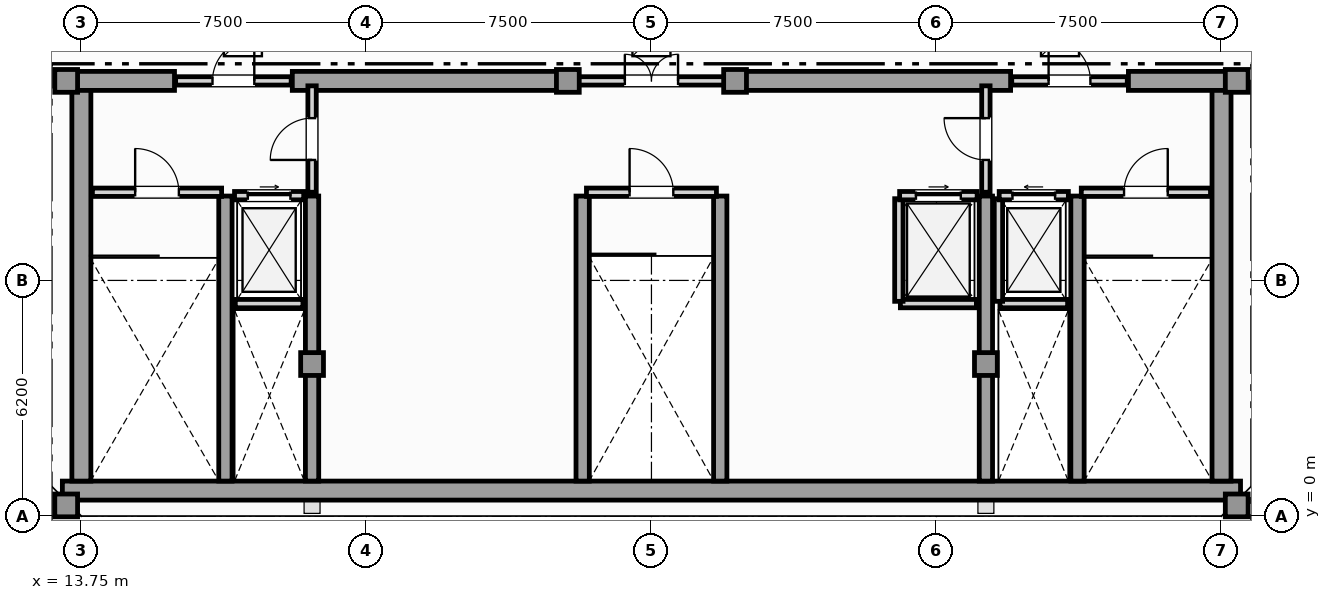
"""IFC4 building model, lengths in metres.
Left out: names, types, materials, properties, quantities, classifications, styles, units other than length and angle.
Written with IfcOpenShell. Run it as: python <this file> out.ifc"""

import sys

from ifc_helpers import new_model, si_unit, direction, frame, frame_2d, origin, origin_2d, place, context, subcontext, project, spatial, rectangle, hollow_rectangle, extrude, element, fill, save


model = new_model("IFC4")
c1 = context("Model", 3, precision=1e-05, world=origin(), true_north=direction((0.0, 1.0)))
c2 = subcontext(c1, "Body", "Model", "MODEL_VIEW")
j1 = project(units=[si_unit("LENGTHUNIT", "METRE"), si_unit("PLANEANGLEUNIT", "RADIAN")], contexts=[c1])
p1 = place(None, origin())
s1 = spatial("IfcSite", under=j1, at=p1, CompositionType="ELEMENT")
p2 = place(p1, origin())
s2 = spatial("IfcBuilding", under=s1, at=p2, CompositionType="ELEMENT")
p3 = place(p2, frame((0.0, 0.0, 388.25)))
s3 = spatial("IfcBuildingStorey", under=s2, at=p3, CompositionType="ELEMENT", Elevation=388.25)
p4 = place(p3, frame((13.25, 0.67, 0.0), z_axis=(0.0, 0.0, 1.0), x_axis=(1.0, 0.0, 0.0)))
e1 = element("IfcWall", 1, at=p4, inside=s3, PredefinedType="SHEAR", context=c2, shape_type="SweptSolid", body=[
    extrude(rectangle(XDim=31.0, YDim=0.5, at=frame_2d((15.5, 0.0))), origin(), (0.0, 0.0, 1.0), 5.0),
])
for number, where, z_axis, x_axis in (
    (2, (13.75, 0.92, 0.0), (0.0, 0.0, 1.0), (0.0, 1.0, 0.0)),
    (3, (43.75, 0.92, 0.0), (0.0, 0.0, 1.0), (0.0, 1.0, 0.0)),
):
    element("IfcWall", number, at=place(p3, frame(where, z_axis=z_axis, x_axis=x_axis)), inside=s3, PredefinedType="SHEAR", context=c2, shape_type="SweptSolid", body=[
        extrude(rectangle(XDim=10.53, YDim=0.5, at=frame_2d((5.265, 0.0))), origin(), (0.0, 0.0, 1.0), 5.0),
    ])
p5 = place(p3, frame((13.25, 11.45, 0.0), z_axis=(0.0, 0.0, 1.0), x_axis=(1.0, 0.0, 0.0)))
e4 = element("IfcWall", 4, at=p5, inside=s3, PredefinedType="SHEAR", context=c2, shape_type="SweptSolid", body=[
    extrude(rectangle(XDim=2.95, YDim=0.5, at=frame_2d((1.475, 0.0))), origin(), (0.0, 0.0, 1.0), 5.0),
])
for number, where, z_axis, x_axis in (
    (5, (19.3, 11.45, 0.0), (0.0, 0.0, 1.0), (1.0, 0.0, 0.0)),
    (6, (30.9, 11.45, 0.0), (0.0, 0.0, 1.0), (1.0, 0.0, 0.0)),
):
    element("IfcWall", number, at=place(p3, frame(where, z_axis=z_axis, x_axis=x_axis)), inside=s3, PredefinedType="SHEAR", context=c2, shape_type="SweptSolid", body=[
        extrude(rectangle(XDim=7.3, YDim=0.5, at=frame_2d((3.65, 0.0))), origin(), (0.0, 0.0, 1.0), 5.0),
    ])
p6 = place(p3, frame((41.3, 11.45, 0.0), z_axis=(0.0, 0.0, 1.0), x_axis=(1.0, 0.0, 0.0)))
e7 = element("IfcWall", 7, at=p6, inside=s3, PredefinedType="SHEAR", context=c2, shape_type="SweptSolid", body=[
    extrude(rectangle(XDim=2.95, YDim=0.5, at=frame_2d((1.475, 0.0))), origin(), (0.0, 0.0, 1.0), 5.0),
])
for number, where, z_axis, x_axis in (
    (8, (17.54, 0.92, 0.0), (0.0, 0.0, 1.0), (0.0, 1.0, 0.0)),
    (9, (19.82, 0.92, 0.0), (0.0, 0.0, 1.0), (0.0, 1.0, 0.0)),
    (10, (26.94, 0.92, 0.0), (0.0, 0.0, 1.0), (0.0, 1.0, 0.0)),
    (11, (30.56, 0.92, 0.0), (0.0, 0.0, 1.0), (0.0, 1.0, 0.0)),
    (12, (37.55, 0.92, 0.0), (0.0, 0.0, 1.0), (0.0, 1.0, 0.0)),
    (13, (39.96, 0.92, 0.0), (0.0, 0.0, 1.0), (0.0, 1.0, 0.0)),
):
    element("IfcWall", number, at=place(p3, frame(where, z_axis=z_axis, x_axis=x_axis)), inside=s3, PredefinedType="SHEAR", context=c2, shape_type="SweptSolid", body=[
        extrude(rectangle(XDim=7.5, YDim=0.35, at=frame_2d((3.75, 0.0))), origin(), (0.0, 0.0, 1.0), 5.0),
    ])
for number, where, z_axis, x_axis in (
    (14, (13.35, 0.28, 0.0), (0.0, 0.0, 1.0), (1.0, 0.0, 0.0)),
    (15, (44.15, 0.28, 0.0), (0.0, 0.0, 1.0), (1.0, 0.0, 0.0)),
    (16, (13.35, 11.45, 0.0), (0.0, 0.0, 1.0), (1.0, 0.0, 0.0)),
    (17, (44.15, 11.45, 0.0), (0.0, 0.0, 1.0), (1.0, 0.0, 0.0)),
    (18, (19.82, 4.0, 0.0), (0.0, 0.0, 1.0), (1.0, 0.0, 0.0)),
    (19, (37.55, 4.0, 0.0), (0.0, 0.0, 1.0), (1.0, 0.0, 0.0)),
    (20, (26.55, 11.45, 0.0), (0.0, 0.0, 1.0), (1.0, 0.0, 0.0)),
    (21, (30.95, 11.45, 0.0), (0.0, 0.0, 1.0), (1.0, 0.0, 0.0)),
):
    element("IfcColumn", number, at=place(p3, frame(where, z_axis=z_axis, x_axis=x_axis)), inside=s3, PredefinedType="USERDEFINED", context=c2, shape_type="SweptSolid", body=[
        extrude(hollow_rectangle(XDim=0.6, YDim=0.6, WallThickness=0.04, at=origin_2d()), origin(), (0.0, 0.0, 1.0), 5.35),
    ])
p7 = place(p3, frame((17.8, 5.59, 0.0), z_axis=(0.0, 0.0, 1.0), x_axis=(1.0, 0.0, 0.0)))
e22 = element("IfcWall", 22, at=p7, inside=s3, PredefinedType="SOLIDWALL", context=c2, shape_type="SweptSolid", body=[
    extrude(rectangle(XDim=1.78, YDim=0.22, at=frame_2d((0.89, 0.0))), origin(), (0.0, 0.0, 1.0), 5.0),
])
p8 = place(p3, frame((17.78, 8.43, 0.0), z_axis=(0.0, 0.0, 1.0), x_axis=(1.0, 0.0, 0.0)))
e23 = element("IfcWall", 23, at=p8, inside=s3, PredefinedType="SOLIDWALL", context=c2, shape_type="SweptSolid", body=[
    extrude(rectangle(XDim=1.82, YDim=0.22, at=frame_2d((0.91, 0.0))), origin(), (0.0, 0.0, 1.0), 5.0),
])
p9 = place(p8, frame((0.35, 0.0, 0.0)))
e24 = element("IfcOpeningElement", 24, at=p9, cuts=e23, PredefinedType="OPENING", context=c2, shape_type="SweptSolid", body=[
    extrude(rectangle(XDim=1.12, YDim=2.25, at=frame_2d((0.56, 1.125))), frame((0.0, 0.12, 0.0), z_axis=(0.0, -1.0, 0.0), x_axis=(1.0, 0.0, 0.0)), (0.0, 0.0, 1.0), 0.24),
])
p10 = place(p3, frame((37.92, 5.59, 0.0), z_axis=(0.0, 0.0, 1.0), x_axis=(1.0, 0.0, 0.0)))
e25 = element("IfcWall", 25, at=p10, inside=s3, PredefinedType="SOLIDWALL", context=c2, shape_type="SweptSolid", body=[
    extrude(rectangle(XDim=1.78, YDim=0.22, at=frame_2d((0.89, 0.0))), origin(), (0.0, 0.0, 1.0), 5.0),
])
p11 = place(p3, frame((37.88, 5.65, 0.0), z_axis=(0.0, 0.0, 1.0), x_axis=(0.0, 1.0, 0.0)))
e26 = element("IfcWall", 26, at=p11, inside=s3, PredefinedType="SOLIDWALL", context=c2, shape_type="SweptSolid", body=[
    extrude(rectangle(XDim=2.7, YDim=0.22, at=frame_2d((1.35, 0.0))), origin(), (0.0, 0.0, 1.0), 5.0),
])
p12 = place(p3, frame((37.9, 8.43, 0.0), z_axis=(0.0, 0.0, 1.0), x_axis=(1.0, 0.0, 0.0)))
e27 = element("IfcWall", 27, at=p12, inside=s3, PredefinedType="SOLIDWALL", context=c2, shape_type="SweptSolid", body=[
    extrude(rectangle(XDim=1.82, YDim=0.22, at=frame_2d((0.91, 0.0))), origin(), (0.0, 0.0, 1.0), 5.0),
])
p13 = place(p12, frame((0.35, 0.0, 0.0)))
e28 = element("IfcOpeningElement", 28, at=p13, cuts=e27, PredefinedType="OPENING", context=c2, shape_type="SweptSolid", body=[
    extrude(rectangle(XDim=1.12, YDim=2.25, at=frame_2d((0.56, 1.125))), frame((0.0, 0.12, 0.0), z_axis=(0.0, -1.0, 0.0), x_axis=(1.0, 0.0, 0.0)), (0.0, 0.0, 1.0), 0.24),
])
p14 = place(p3, frame((35.3, 5.59, 0.0), z_axis=(0.0, 0.0, 1.0), x_axis=(1.0, 0.0, 0.0)))
e29 = element("IfcWall", 29, at=p14, inside=s3, PredefinedType="SOLIDWALL", context=c2, shape_type="SweptSolid", body=[
    extrude(rectangle(XDim=2.0, YDim=0.22, at=frame_2d((1.0, 0.0))), origin(), (0.0, 0.0, 1.0), 5.0),
])
p15 = place(p3, frame((35.26, 5.65, 0.0), z_axis=(0.0, 0.0, 1.0), x_axis=(0.0, 1.0, 0.0)))
e30 = element("IfcWall", 30, at=p15, inside=s3, PredefinedType="SOLIDWALL", context=c2, shape_type="SweptSolid", body=[
    extrude(rectangle(XDim=2.7, YDim=0.22, at=frame_2d((1.35, 0.0))), origin(), (0.0, 0.0, 1.0), 5.0),
])
p16 = place(p3, frame((35.28, 8.43, 0.0), z_axis=(0.0, 0.0, 1.0), x_axis=(1.0, 0.0, 0.0)))
e31 = element("IfcWall", 31, at=p16, inside=s3, PredefinedType="SOLIDWALL", context=c2, shape_type="SweptSolid", body=[
    extrude(rectangle(XDim=2.04, YDim=0.22, at=frame_2d((1.02, 0.0))), origin(), (0.0, 0.0, 1.0), 5.0),
])
p17 = place(p16, frame((0.43, 0.0, 0.0)))
e32 = element("IfcOpeningElement", 32, at=p17, cuts=e31, PredefinedType="OPENING", context=c2, shape_type="SweptSolid", body=[
    extrude(rectangle(XDim=1.18, YDim=2.2, at=frame_2d((0.59, 1.1))), frame((0.0, 0.12, 0.0), z_axis=(0.0, -1.0, 0.0), x_axis=(1.0, 0.0, 0.0)), (0.0, 0.0, 1.0), 0.24),
])
p18 = place(p3, frame((14.04, 8.52, 0.0), z_axis=(0.0, 0.0, 1.0), x_axis=(1.0, 0.0, 0.0)))
e33 = element("IfcWall", 33, at=p18, inside=s3, PredefinedType="SOLIDWALL", context=c2, shape_type="SweptSolid", body=[
    extrude(rectangle(XDim=3.4, YDim=0.22, at=frame_2d((1.7, 0.0))), origin(), (0.0, 0.0, 1.0), 5.0),
])
p19 = place(p18, frame((1.125, 0.0, 0.0)))
e34 = element("IfcOpeningElement", 34, at=p19, cuts=e33, PredefinedType="OPENING", context=c2, shape_type="SweptSolid", body=[
    extrude(rectangle(XDim=1.15, YDim=2.2, at=frame_2d((0.575, 1.1))), frame((0.0, 0.12, 0.0), z_axis=(0.0, -1.0, 0.0), x_axis=(1.0, 0.0, 0.0)), (0.0, 0.0, 1.0), 0.24),
])
p20 = place(p3, frame((40.06, 8.52, 0.0), z_axis=(0.0, 0.0, 1.0), x_axis=(1.0, 0.0, 0.0)))
e35 = element("IfcWall", 35, at=p20, inside=s3, PredefinedType="SOLIDWALL", context=c2, shape_type="SweptSolid", body=[
    extrude(rectangle(XDim=3.4, YDim=0.22, at=frame_2d((1.7, 0.0))), origin(), (0.0, 0.0, 1.0), 5.0),
])
p21 = place(p20, frame((1.125, 0.0, 0.0)))
e36 = element("IfcOpeningElement", 36, at=p21, cuts=e35, PredefinedType="OPENING", context=c2, shape_type="SweptSolid", body=[
    extrude(rectangle(XDim=1.15, YDim=2.2, at=frame_2d((0.575, 1.1))), frame((0.0, 0.12, 0.0), z_axis=(0.0, -1.0, 0.0), x_axis=(1.0, 0.0, 0.0)), (0.0, 0.0, 1.0), 0.24),
])
p22 = place(p3, frame((27.04, 8.52, 0.0), z_axis=(0.0, 0.0, 1.0), x_axis=(1.0, 0.0, 0.0)))
e37 = element("IfcWall", 37, at=p22, inside=s3, PredefinedType="SOLIDWALL", context=c2, shape_type="SweptSolid", body=[
    extrude(rectangle(XDim=3.42, YDim=0.22, at=frame_2d((1.71, 0.0))), origin(), (0.0, 0.0, 1.0), 5.0),
])
p23 = place(p22, frame((1.135, 0.0, 0.0)))
e38 = element("IfcOpeningElement", 38, at=p23, cuts=e37, PredefinedType="OPENING", context=c2, shape_type="SweptSolid", body=[
    extrude(rectangle(XDim=1.15, YDim=2.2, at=frame_2d((0.575, 1.1))), frame((0.0, 0.12, 0.0), z_axis=(0.0, -1.0, 0.0), x_axis=(1.0, 0.0, 0.0)), (0.0, 0.0, 1.0), 0.24),
])
p24 = place(p3, frame((19.82, 8.52, 0.0), z_axis=(0.0, 0.0, 1.0), x_axis=(0.0, 1.0, 0.0)))
e39 = element("IfcWall", 39, at=p24, inside=s3, PredefinedType="SOLIDWALL", context=c2, shape_type="SweptSolid", body=[
    extrude(rectangle(XDim=2.8, YDim=0.22, at=frame_2d((1.4, 0.0))), origin(), (0.0, 0.0, 1.0), 4.456),
])
p25 = place(p24, frame((0.85, 0.0, 0.0)))
e40 = element("IfcOpeningElement", 40, at=p25, cuts=e39, PredefinedType="OPENING", context=c2, shape_type="SweptSolid", body=[
    extrude(rectangle(XDim=1.1, YDim=2.2, at=frame_2d((0.55, 1.1))), frame((0.0, 0.12, 0.0), z_axis=(0.0, -1.0, 0.0), x_axis=(1.0, 0.0, 0.0)), (0.0, 0.0, 1.0), 0.24),
])
p26 = place(p3, frame((37.55, 8.52, 0.0), z_axis=(0.0, 0.0, 1.0), x_axis=(0.0, 1.0, 0.0)))
e41 = element("IfcWall", 41, at=p26, inside=s3, PredefinedType="SOLIDWALL", context=c2, shape_type="SweptSolid", body=[
    extrude(rectangle(XDim=2.8, YDim=0.22, at=frame_2d((1.4, 0.0))), origin(), (0.0, 0.0, 1.0), 4.456),
])
p27 = place(p26, frame((0.85, 0.0, 0.0)))
e42 = element("IfcOpeningElement", 42, at=p27, cuts=e41, PredefinedType="OPENING", context=c2, shape_type="SweptSolid", body=[
    extrude(rectangle(XDim=1.1, YDim=2.2, at=frame_2d((0.55, 1.1))), frame((0.0, 0.12, 0.0), z_axis=(0.0, -1.0, 0.0), x_axis=(1.0, 0.0, 0.0)), (0.0, 0.0, 1.0), 0.24),
])
p28 = place(p3, frame((16.23, 11.45, 0.0), z_axis=(0.0, 0.0, 1.0), x_axis=(1.0, 0.0, 0.0)))
e43 = element("IfcWall", 43, at=p28, inside=s3, PredefinedType="SOLIDWALL", context=c2, shape_type="SweptSolid", body=[
    extrude(rectangle(XDim=3.04, YDim=0.22, at=frame_2d((1.52, 0.0))), origin(), (0.0, 0.0, 1.0), 5.0),
])
p29 = place(p28, frame((0.97, 0.0, 0.0)))
e44 = element("IfcOpeningElement", 44, at=p29, cuts=e43, PredefinedType="OPENING", context=c2, shape_type="SweptSolid", body=[
    extrude(rectangle(XDim=1.1, YDim=2.2, at=frame_2d((0.55, 1.1))), frame((0.0, 0.12, 0.0), z_axis=(0.0, -1.0, 0.0), x_axis=(1.0, 0.0, 0.0)), (0.0, 0.0, 1.0), 0.24),
])
p30 = place(p3, frame((26.63, 11.45, 0.0), z_axis=(0.0, 0.0, 1.0), x_axis=(1.0, 0.0, 0.0)))
e45 = element("IfcWall", 45, at=p30, inside=s3, PredefinedType="SOLIDWALL", context=c2, shape_type="SweptSolid", body=[
    extrude(rectangle(XDim=4.24, YDim=0.22, at=frame_2d((2.12, 0.0))), origin(), (0.0, 0.0, 1.0), 5.0),
])
p31 = place(p30, frame((1.42, 0.0, 0.0)))
e46 = element("IfcOpeningElement", 46, at=p31, cuts=e45, PredefinedType="OPENING", context=c2, shape_type="SweptSolid", body=[
    extrude(rectangle(XDim=1.4, YDim=2.2, at=frame_2d((0.7, 1.1))), frame((0.0, 0.12, 0.0), z_axis=(0.0, -1.0, 0.0), x_axis=(1.0, 0.0, 0.0)), (0.0, 0.0, 1.0), 0.24),
])
p32 = place(p3, frame((38.23, 11.45, 0.0), z_axis=(0.0, 0.0, 1.0), x_axis=(1.0, 0.0, 0.0)))
e47 = element("IfcWall", 47, at=p32, inside=s3, PredefinedType="SOLIDWALL", context=c2, shape_type="SweptSolid", body=[
    extrude(rectangle(XDim=3.04, YDim=0.22, at=frame_2d((1.52, 0.0))), origin(), (0.0, 0.0, 1.0), 5.0),
])
p33 = place(p32, frame((0.97, 0.0, 0.0)))
e48 = element("IfcOpeningElement", 48, at=p33, cuts=e47, PredefinedType="OPENING", context=c2, shape_type="SweptSolid", body=[
    extrude(rectangle(XDim=1.1, YDim=2.2, at=frame_2d((0.55, 1.1))), frame((0.0, 0.12, 0.0), z_axis=(0.0, -1.0, 0.0), x_axis=(1.0, 0.0, 0.0)), (0.0, 0.0, 1.0), 0.24),
])
p34 = place(p3, frame((0.0, 0.0, -0.3)))
p35 = place(p34, frame((18.0, 12.6, 0.25)))
e49 = element("IfcDoor", 49, at=p35, inside=s3, OperationType="SINGLE_SWING_LEFT", PredefinedType="TRAPDOOR", context=c2, shape_type="SweptSolid", body=[
    extrude(rectangle(XDim=1.0, YDim=1.0, at=origin_2d()), origin(), (0.0, 0.0, 1.0), 0.05),
])
p36 = place(p34, frame((28.75, 12.6, 0.25)))
e50 = element("IfcDoor", 50, at=p36, inside=s3, OperationType="SINGLE_SWING_LEFT", PredefinedType="TRAPDOOR", context=c2, shape_type="SweptSolid", body=[
    extrude(rectangle(XDim=1.0, YDim=1.0, at=origin_2d()), origin(), (0.0, 0.0, 1.0), 0.05),
])
p37 = place(p34, frame((39.5, 12.6, 0.25)))
e51 = element("IfcDoor", 51, at=p37, inside=s3, OperationType="SINGLE_SWING_LEFT", PredefinedType="TRAPDOOR", context=c2, shape_type="SweptSolid", body=[
    extrude(rectangle(XDim=1.0, YDim=1.0, at=origin_2d()), origin(), (0.0, 0.0, 1.0), 0.05),
])
p38 = place(p9, origin())
e52 = element("IfcDoor", 52, at=p38, inside=s3, OperationType="SLIDING_TO_RIGHT", PredefinedType="DOOR", context=c2, shape_type="SweptSolid", body=[
    extrude(rectangle(XDim=1.12, YDim=2.25, at=frame_2d((0.56, 1.125))), frame((0.0, 0.025, 0.0), z_axis=(0.0, -1.0, 0.0), x_axis=(1.0, 0.0, 0.0)), (0.0, 0.0, 1.0), 0.05),
])
fill(e24, e52)
p39 = place(p13, origin())
e53 = element("IfcDoor", 53, at=p39, inside=s3, OperationType="SLIDING_TO_LEFT", PredefinedType="DOOR", context=c2, shape_type="SweptSolid", body=[
    extrude(rectangle(XDim=1.12, YDim=2.25, at=frame_2d((0.56, 1.125))), frame((0.0, 0.025, 0.0), z_axis=(0.0, -1.0, 0.0), x_axis=(1.0, 0.0, 0.0)), (0.0, 0.0, 1.0), 0.05),
])
fill(e28, e53)
p40 = place(p17, origin())
e54 = element("IfcDoor", 54, at=p40, inside=s3, OperationType="SLIDING_TO_RIGHT", PredefinedType="DOOR", context=c2, shape_type="SweptSolid", body=[
    extrude(rectangle(XDim=1.18, YDim=2.2, at=frame_2d((0.59, 1.1))), frame((0.0, 0.025, 0.0), z_axis=(0.0, -1.0, 0.0), x_axis=(1.0, 0.0, 0.0)), (0.0, 0.0, 1.0), 0.05),
])
fill(e32, e54)
p41 = place(p19, origin())
e55 = element("IfcDoor", 55, at=p41, inside=s3, OperationType="SINGLE_SWING_LEFT", PredefinedType="DOOR", context=c2, shape_type="SweptSolid", body=[
    extrude(rectangle(XDim=1.15, YDim=2.2, at=frame_2d((0.575, 1.1))), frame((0.0, 0.025, 0.0), z_axis=(0.0, -1.0, 0.0), x_axis=(1.0, 0.0, 0.0)), (0.0, 0.0, 1.0), 0.05),
])
fill(e34, e55)
p42 = place(p21, origin())
e56 = element("IfcDoor", 56, at=p42, inside=s3, OperationType="SINGLE_SWING_RIGHT", PredefinedType="DOOR", context=c2, shape_type="SweptSolid", body=[
    extrude(rectangle(XDim=1.15, YDim=2.2, at=frame_2d((0.575, 1.1))), frame((0.0, 0.025, 0.0), z_axis=(0.0, -1.0, 0.0), x_axis=(1.0, 0.0, 0.0)), (0.0, 0.0, 1.0), 0.05),
])
fill(e36, e56)
p43 = place(p23, origin())
e57 = element("IfcDoor", 57, at=p43, inside=s3, OperationType="SINGLE_SWING_LEFT", PredefinedType="DOOR", context=c2, shape_type="SweptSolid", body=[
    extrude(rectangle(XDim=1.15, YDim=2.2, at=frame_2d((0.575, 1.1))), frame((0.0, 0.025, 0.0), z_axis=(0.0, -1.0, 0.0), x_axis=(1.0, 0.0, 0.0)), (0.0, 0.0, 1.0), 0.05),
])
fill(e38, e57)
p44 = place(p25, origin())
e58 = element("IfcDoor", 58, at=p44, inside=s3, OperationType="SINGLE_SWING_LEFT", PredefinedType="DOOR", context=c2, shape_type="SweptSolid", body=[
    extrude(rectangle(XDim=1.1, YDim=2.2, at=frame_2d((0.55, 1.1))), frame((0.0, 0.025, 0.0), z_axis=(0.0, -1.0, 0.0), x_axis=(1.0, 0.0, 0.0)), (0.0, 0.0, 1.0), 0.05),
])
fill(e40, e58)
p45 = place(p27, origin())
e59 = element("IfcDoor", 59, at=p45, inside=s3, OperationType="SINGLE_SWING_RIGHT", PredefinedType="DOOR", context=c2, shape_type="SweptSolid", body=[
    extrude(rectangle(XDim=1.1, YDim=2.2, at=frame_2d((0.55, 1.1))), frame((0.0, 0.025, 0.0), z_axis=(0.0, -1.0, 0.0), x_axis=(1.0, 0.0, 0.0)), (0.0, 0.0, 1.0), 0.05),
])
fill(e42, e59)
p46 = place(p29, origin())
e60 = element("IfcDoor", 60, at=p46, inside=s3, OperationType="SINGLE_SWING_RIGHT", PredefinedType="DOOR", context=c2, shape_type="SweptSolid", body=[
    extrude(rectangle(XDim=1.1, YDim=2.2, at=frame_2d((0.55, 1.1))), frame((0.0, 0.025, 0.0), z_axis=(0.0, -1.0, 0.0), x_axis=(1.0, 0.0, 0.0)), (0.0, 0.0, 1.0), 0.05),
])
fill(e44, e60)
p47 = place(p31, origin())
e61 = element("IfcDoor", 61, at=p47, inside=s3, OperationType="DOUBLE_DOOR_SINGLE_SWING", PredefinedType="DOOR", context=c2, shape_type="SweptSolid", body=[
    extrude(rectangle(XDim=1.4, YDim=2.2, at=frame_2d((0.7, 1.1))), frame((0.0, 0.025, 0.0), z_axis=(0.0, -1.0, 0.0), x_axis=(1.0, 0.0, 0.0)), (0.0, 0.0, 1.0), 0.05),
])
fill(e46, e61)
p48 = place(p33, origin())
e62 = element("IfcDoor", 62, at=p48, inside=s3, OperationType="SINGLE_SWING_LEFT", PredefinedType="DOOR", context=c2, shape_type="SweptSolid", body=[
    extrude(rectangle(XDim=1.1, YDim=2.2, at=frame_2d((0.55, 1.1))), frame((0.0, 0.025, 0.0), z_axis=(0.0, -1.0, 0.0), x_axis=(1.0, 0.0, 0.0)), (0.0, 0.0, 1.0), 0.05),
])
fill(e48, e62)
save(model, sys.argv[1])
